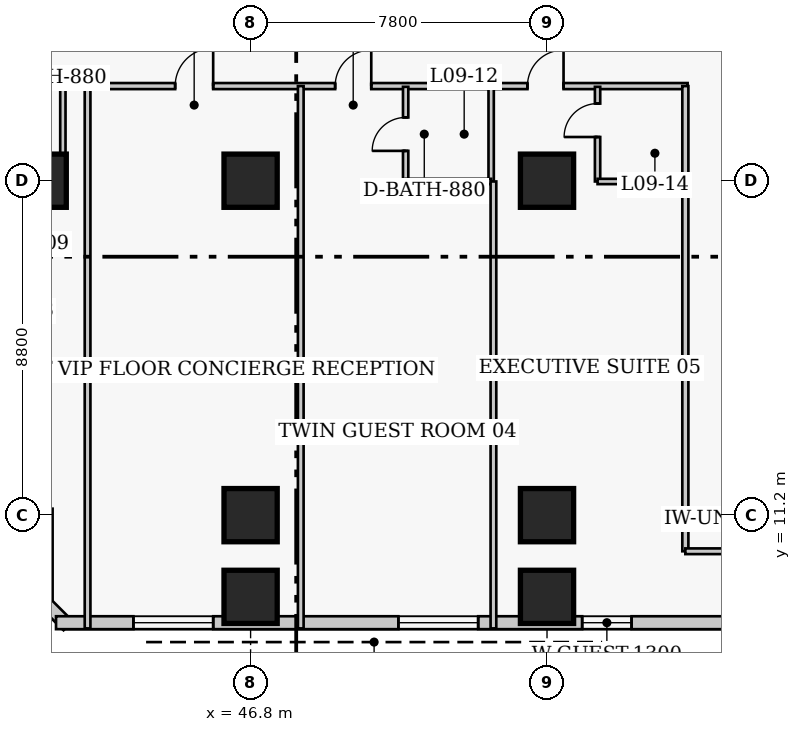
"""IFC4 building model, lengths in metres.
Left out: names, types, materials, properties, quantities, classifications, styles, units other than length and angle.
Written with IfcOpenShell. Run it as: python <this file> out.ifc"""

import sys

from ifc_helpers import new_model, si_unit, direction, frame, frame_2d, origin, origin_2d, place, context, subcontext, project, spatial, rectangle, extrude, element, fill, save


model = new_model("IFC4")
c1 = context("Model", 3, precision=1e-05, world=origin(), true_north=direction((0.0, 1.0)))
c2 = subcontext(c1, "Body", "Model", "MODEL_VIEW")
j1 = project(units=[si_unit("LENGTHUNIT", "METRE"), si_unit("PLANEANGLEUNIT", "RADIAN")], contexts=[c1])
p1 = place(None, origin())
s1 = spatial("IfcSite", under=j1, at=p1, CompositionType="ELEMENT")
p2 = place(p1, origin())
s2 = spatial("IfcBuilding", under=s1, at=p2, CompositionType="ELEMENT")
p3 = place(p2, frame((0.0, 0.0, 41.2)))
s3 = spatial("IfcBuildingStorey", under=s2, at=p3, CompositionType="ELEMENT", Elevation=41.2)
for number, where, z_axis, x_axis in (
    (1, (41.25, 20.0, 0.0), (0.0, 0.0, 1.0), (1.0, 0.0, 0.0)),
    (2, (46.8, 11.2, 0.0), (0.0, 0.0, 1.0), (1.0, 0.0, 0.0)),
    (3, (46.8, 20.0, 0.0), (0.0, 0.0, 1.0), (1.0, 0.0, 0.0)),
    (4, (54.6, 11.2, 0.0), (0.0, 0.0, 1.0), (1.0, 0.0, 0.0)),
    (5, (54.6, 20.0, 0.0), (0.0, 0.0, 1.0), (1.0, 0.0, 0.0)),
    (6, (46.8, 9.05, 0.0), (0.0, 0.0, 1.0), (1.0, 0.0, 0.0)),
    (7, (54.6, 9.05, 0.0), (0.0, 0.0, 1.0), (1.0, 0.0, 0.0)),
):
    element("IfcColumn", number, at=place(p3, frame(where, z_axis=z_axis, x_axis=x_axis)), inside=s3, PredefinedType="COLUMN", context=c2, shape_type="SweptSolid", body=[
        extrude(rectangle(XDim=1.4, YDim=1.4, at=origin_2d()), origin(), (0.0, 0.0, 1.0), 3.8),
    ])
p4 = place(p3, frame((41.342, 8.948, 0.0), z_axis=(0.0, 0.0, 1.0), x_axis=(0.707238225886, -0.706975312048, 0.0)))
e8 = element("IfcWall", 8, at=p4, inside=s3, PredefinedType="SOLIDWALL", context=c2, shape_type="SweptSolid", body=[
    extrude(rectangle(XDim=0.929, YDim=0.34, at=frame_2d((0.464, 0.0))), origin(), (0.0, 0.0, 1.0), 3.54),
])
p5 = place(p3, frame((41.68, 8.37, 0.0), z_axis=(0.0, 0.0, 1.0), x_axis=(1.0, 0.0, 0.0)))
e9 = element("IfcWall", 9, at=p5, inside=s3, PredefinedType="SOLIDWALL", context=c2, shape_type="SweptSolid", body=[
    extrude(rectangle(XDim=29.89, YDim=0.34, at=frame_2d((14.945, 0.0))), origin(), (0.0, 0.0, 1.0), 3.54),
])
p6 = place(p5, frame((2.036, 0.0, 0.85)))
e10 = element("IfcOpeningElement", 10, at=p6, cuts=e9, PredefinedType="OPENING", context=c2, shape_type="SweptSolid", body=[
    extrude(rectangle(XDim=2.1, YDim=1.85, at=frame_2d((1.05, 0.925))), frame((0.0, 0.18, 0.0), z_axis=(0.0, -1.0, 0.0), x_axis=(1.0, 0.0, 0.0)), (0.0, 0.0, 1.0), 0.36),
])
p7 = place(p5, frame((9.009, 0.0, 0.85)))
e11 = element("IfcOpeningElement", 11, at=p7, cuts=e9, PredefinedType="OPENING", context=c2, shape_type="SweptSolid", body=[
    extrude(rectangle(XDim=2.1, YDim=1.85, at=frame_2d((1.05, 0.925))), frame((0.0, 0.18, 0.0), z_axis=(0.0, -1.0, 0.0), x_axis=(1.0, 0.0, 0.0)), (0.0, 0.0, 1.0), 0.36),
])
p8 = place(p5, frame((26.254, 0.0, 0.85)))
e12 = element("IfcOpeningElement", 12, at=p8, cuts=e9, PredefinedType="OPENING", context=c2, shape_type="SweptSolid", body=[
    extrude(rectangle(XDim=2.1, YDim=1.85, at=frame_2d((1.05, 0.925))), frame((0.0, 0.18, 0.0), z_axis=(0.0, -1.0, 0.0), x_axis=(1.0, 0.0, 0.0)), (0.0, 0.0, 1.0), 0.36),
])
p9 = place(p5, frame((13.845, 0.0, 0.85)))
e13 = element("IfcOpeningElement", 13, at=p9, cuts=e9, PredefinedType="OPENING", context=c2, shape_type="SweptSolid", body=[
    extrude(rectangle(XDim=1.3, YDim=1.7, at=frame_2d((0.65, 0.85))), frame((0.0, 0.18, 0.0), z_axis=(0.0, -1.0, 0.0), x_axis=(1.0, 0.0, 0.0)), (0.0, 0.0, 1.0), 0.36),
])
p10 = place(p3, frame((35.8, 22.49, 0.0), z_axis=(0.0, 0.0, 1.0), x_axis=(1.0, 0.0, 0.0)))
e14 = element("IfcWall", 14, at=p10, inside=s3, PredefinedType="PARTITIONING", context=c2, shape_type="SweptSolid", body=[
    extrude(rectangle(XDim=22.5, YDim=0.16, at=frame_2d((11.25, 0.0))), origin(), (0.0, 0.0, 1.0), 3.54),
])
p11 = place(p10, frame((1.43, 0.0, 0.0)))
e15 = element("IfcOpeningElement", 15, at=p11, cuts=e14, PredefinedType="OPENING", context=c2, shape_type="SweptSolid", body=[
    extrude(rectangle(XDim=0.95, YDim=2.1, at=frame_2d((0.475, 1.05))), frame((0.0, 0.09, 0.0), z_axis=(0.0, -1.0, 0.0), x_axis=(1.0, 0.0, 0.0)), (0.0, 0.0, 1.0), 0.18),
])
p12 = place(p10, frame((9.015, 0.0, 0.0)))
e16 = element("IfcOpeningElement", 16, at=p12, cuts=e14, PredefinedType="OPENING", context=c2, shape_type="SweptSolid", body=[
    extrude(rectangle(XDim=1.0, YDim=2.15, at=frame_2d((0.5, 1.075))), frame((0.0, 0.09, 0.0), z_axis=(0.0, -1.0, 0.0), x_axis=(1.0, 0.0, 0.0)), (0.0, 0.0, 1.0), 0.18),
])
p13 = place(p10, frame((13.225, 0.0, 0.0)))
e17 = element("IfcOpeningElement", 17, at=p13, cuts=e14, PredefinedType="OPENING", context=c2, shape_type="SweptSolid", body=[
    extrude(rectangle(XDim=0.95, YDim=2.1, at=frame_2d((0.475, 1.05))), frame((0.0, 0.09, 0.0), z_axis=(0.0, -1.0, 0.0), x_axis=(1.0, 0.0, 0.0)), (0.0, 0.0, 1.0), 0.18),
])
p14 = place(p10, frame((18.285, 0.0, 0.0)))
e18 = element("IfcOpeningElement", 18, at=p14, cuts=e14, PredefinedType="OPENING", context=c2, shape_type="SweptSolid", body=[
    extrude(rectangle(XDim=0.95, YDim=2.1, at=frame_2d((0.475, 1.05))), frame((0.0, 0.09, 0.0), z_axis=(0.0, -1.0, 0.0), x_axis=(1.0, 0.0, 0.0)), (0.0, 0.0, 1.0), 0.18),
])
p15 = place(p3, frame((58.24, 10.25, 0.0), z_axis=(0.0, 0.0, 1.0), x_axis=(0.0, 1.0, 0.0)))
e19 = element("IfcWall", 19, at=p15, inside=s3, PredefinedType="PARTITIONING", context=c2, shape_type="SweptSolid", body=[
    extrude(rectangle(XDim=12.24, YDim=0.16, at=frame_2d((6.12, 0.0))), origin(), (0.0, 0.0, 1.0), 3.54),
])
p16 = place(p3, frame((58.24, 10.25, 0.0), z_axis=(0.0, 0.0, 1.0), x_axis=(1.0, 0.0, 0.0)))
e20 = element("IfcWall", 20, at=p16, inside=s3, PredefinedType="PARTITIONING", context=c2, shape_type="SweptSolid", body=[
    extrude(rectangle(XDim=2.22, YDim=0.15, at=frame_2d((1.11, 0.0))), origin(), (0.0, 0.0, 1.0), 3.54),
])
p17 = place(p3, frame((41.86, 19.98, 0.0), z_axis=(0.0, 0.0, 1.0), x_axis=(0.0, 1.0, 0.0)))
e21 = element("IfcWall", 21, at=p17, inside=s3, PredefinedType="PLUMBINGWALL", context=c2, shape_type="SweptSolid", body=[
    extrude(rectangle(XDim=2.49, YDim=0.14, at=frame_2d((1.245, 0.0))), origin(), (0.0, 0.0, 1.0), 3.54),
])
p18 = place(p3, frame((39.61, 19.98, 0.0), z_axis=(0.0, 0.0, 1.0), x_axis=(1.0, 0.0, 0.0)))
e22 = element("IfcWall", 22, at=p18, inside=s3, PredefinedType="PLUMBINGWALL", context=c2, shape_type="SweptSolid", body=[
    extrude(rectangle(XDim=2.25, YDim=0.14, at=frame_2d((1.125, 0.0))), origin(), (0.0, 0.0, 1.0), 2.593),
])
for number, where, z_axis, x_axis in (
    (23, (42.51, 8.22, 0.0), (0.0, 0.0, 1.0), (0.0, 1.0, 0.0)),
    (24, (48.12, 8.22, 0.0), (0.0, 0.0, 1.0), (0.0, 1.0, 0.0)),
):
    element("IfcWall", number, at=place(p3, frame(where, z_axis=z_axis, x_axis=x_axis)), inside=s3, PredefinedType="PARTITIONING", context=c2, shape_type="SweptSolid", body=[
        extrude(rectangle(XDim=14.27, YDim=0.15, at=frame_2d((7.135, 0.0))), origin(), (0.0, 0.0, 1.0), 3.54),
    ])
p19 = place(p3, frame((50.88, 19.98, 0.0), z_axis=(0.0, 0.0, 1.0), x_axis=(0.0, 1.0, 0.0)))
e25 = element("IfcWall", 25, at=p19, inside=s3, PredefinedType="PLUMBINGWALL", context=c2, shape_type="SweptSolid", body=[
    extrude(rectangle(XDim=2.49, YDim=0.14, at=frame_2d((1.245, 0.0))), origin(), (0.0, 0.0, 1.0), 3.54),
])
p20 = place(p19, frame((0.805, 0.0, 0.0)))
e26 = element("IfcOpeningElement", 26, at=p20, cuts=e25, PredefinedType="OPENING", context=c2, shape_type="SweptSolid", body=[
    extrude(rectangle(XDim=0.88, YDim=2.05, at=frame_2d((0.44, 1.025))), frame((0.0, 0.08, 0.0), z_axis=(0.0, -1.0, 0.0), x_axis=(1.0, 0.0, 0.0)), (0.0, 0.0, 1.0), 0.16),
])
p21 = place(p3, frame((53.13, 19.98, 0.0), z_axis=(0.0, 0.0, 1.0), x_axis=(0.0, 1.0, 0.0)))
e27 = element("IfcWall", 27, at=p21, inside=s3, PredefinedType="PLUMBINGWALL", context=c2, shape_type="SweptSolid", body=[
    extrude(rectangle(XDim=2.49, YDim=0.14, at=frame_2d((1.245, 0.0))), origin(), (0.0, 0.0, 1.0), 3.54),
])
p22 = place(p3, frame((50.88, 19.98, 0.0), z_axis=(0.0, 0.0, 1.0), x_axis=(1.0, 0.0, 0.0)))
e28 = element("IfcWall", 28, at=p22, inside=s3, PredefinedType="PLUMBINGWALL", context=c2, shape_type="SweptSolid", body=[
    extrude(rectangle(XDim=2.25, YDim=0.14, at=frame_2d((1.125, 0.0))), origin(), (0.0, 0.0, 1.0), 2.593),
])
p23 = place(p3, frame((53.19, 8.22, 0.0), z_axis=(0.0, 0.0, 1.0), x_axis=(0.0, 1.0, 0.0)))
e29 = element("IfcWall", 29, at=p23, inside=s3, PredefinedType="PARTITIONING", context=c2, shape_type="SweptSolid", body=[
    extrude(rectangle(XDim=11.76, YDim=0.15, at=frame_2d((5.88, 0.0))), origin(), (0.0, 0.0, 1.0), 3.54),
])
p24 = place(p3, frame((55.93, 19.98, 0.0), z_axis=(0.0, 0.0, 1.0), x_axis=(0.0, 1.0, 0.0)))
e30 = element("IfcWall", 30, at=p24, inside=s3, PredefinedType="PLUMBINGWALL", context=c2, shape_type="SweptSolid", body=[
    extrude(rectangle(XDim=2.49, YDim=0.14, at=frame_2d((1.245, 0.0))), origin(), (0.0, 0.0, 1.0), 3.54),
])
p25 = place(p24, frame((1.17, 0.0, 0.0)))
e31 = element("IfcOpeningElement", 31, at=p25, cuts=e30, PredefinedType="OPENING", context=c2, shape_type="SweptSolid", body=[
    extrude(rectangle(XDim=0.88, YDim=2.05, at=frame_2d((0.44, 1.025))), frame((0.0, 0.08, 0.0), z_axis=(0.0, -1.0, 0.0), x_axis=(1.0, 0.0, 0.0)), (0.0, 0.0, 1.0), 0.16),
])
p26 = place(p3, frame((55.93, 19.98, 0.0), z_axis=(0.0, 0.0, 1.0), x_axis=(1.0, 0.0, 0.0)))
e32 = element("IfcWall", 32, at=p26, inside=s3, PredefinedType="PLUMBINGWALL", context=c2, shape_type="SweptSolid", body=[
    extrude(rectangle(XDim=2.25, YDim=0.14, at=frame_2d((1.125, 0.0))), origin(), (0.0, 0.0, 1.0), 2.593),
])
p27 = place(p6, origin())
e33 = element("IfcWindow", 33, at=p27, inside=s3, PartitioningType="SINGLE_PANEL", PredefinedType="WINDOW", context=c2, shape_type="SweptSolid", body=[
    extrude(rectangle(XDim=2.1, YDim=1.85, at=frame_2d((1.05, 0.925))), frame((0.0, 0.03, 0.0), z_axis=(0.0, -1.0, 0.0), x_axis=(1.0, 0.0, 0.0)), (0.0, 0.0, 1.0), 0.06),
])
fill(e10, e33)
p28 = place(p7, origin())
e34 = element("IfcWindow", 34, at=p28, inside=s3, PartitioningType="SINGLE_PANEL", PredefinedType="WINDOW", context=c2, shape_type="SweptSolid", body=[
    extrude(rectangle(XDim=2.1, YDim=1.85, at=frame_2d((1.05, 0.925))), frame((0.0, 0.03, 0.0), z_axis=(0.0, -1.0, 0.0), x_axis=(1.0, 0.0, 0.0)), (0.0, 0.0, 1.0), 0.06),
])
fill(e11, e34)
p29 = place(p9, origin())
e35 = element("IfcWindow", 35, at=p29, inside=s3, PartitioningType="SINGLE_PANEL", PredefinedType="WINDOW", context=c2, shape_type="SweptSolid", body=[
    extrude(rectangle(XDim=1.3, YDim=1.7, at=frame_2d((0.65, 0.85))), frame((0.0, 0.03, 0.0), z_axis=(0.0, -1.0, 0.0), x_axis=(1.0, 0.0, 0.0)), (0.0, 0.0, 1.0), 0.06),
])
fill(e13, e35)
p30 = place(p12, origin())
e36 = element("IfcDoor", 36, at=p30, inside=s3, OperationType="SINGLE_SWING_RIGHT", PredefinedType="DOOR", context=c2, shape_type="SweptSolid", body=[
    extrude(rectangle(XDim=1.0, YDim=2.15, at=frame_2d((0.5, 1.075))), frame((0.0, 0.025, 0.0), z_axis=(0.0, -1.0, 0.0), x_axis=(1.0, 0.0, 0.0)), (0.0, 0.0, 1.0), 0.05),
])
fill(e16, e36)
p31 = place(p20, origin())
e37 = element("IfcDoor", 37, at=p31, inside=s3, OperationType="SINGLE_SWING_LEFT", PredefinedType="DOOR", context=c2, shape_type="SweptSolid", body=[
    extrude(rectangle(XDim=0.88, YDim=2.05, at=frame_2d((0.44, 1.025))), frame((0.0, 0.025, 0.0), z_axis=(0.0, -1.0, 0.0), x_axis=(1.0, 0.0, 0.0)), (0.0, 0.0, 1.0), 0.05),
])
fill(e26, e37)
p32 = place(p13, origin())
e38 = element("IfcDoor", 38, at=p32, inside=s3, OperationType="SINGLE_SWING_RIGHT", PredefinedType="DOOR", context=c2, shape_type="SweptSolid", body=[
    extrude(rectangle(XDim=0.95, YDim=2.1, at=frame_2d((0.475, 1.05))), frame((0.0, 0.025, 0.0), z_axis=(0.0, -1.0, 0.0), x_axis=(1.0, 0.0, 0.0)), (0.0, 0.0, 1.0), 0.05),
])
fill(e17, e38)
p33 = place(p25, origin())
e39 = element("IfcDoor", 39, at=p33, inside=s3, OperationType="SINGLE_SWING_LEFT", PredefinedType="DOOR", context=c2, shape_type="SweptSolid", body=[
    extrude(rectangle(XDim=0.88, YDim=2.05, at=frame_2d((0.44, 1.025))), frame((0.0, 0.025, 0.0), z_axis=(0.0, -1.0, 0.0), x_axis=(1.0, 0.0, 0.0)), (0.0, 0.0, 1.0), 0.05),
])
fill(e31, e39)
p34 = place(p14, origin())
e40 = element("IfcDoor", 40, at=p34, inside=s3, OperationType="SINGLE_SWING_RIGHT", PredefinedType="DOOR", context=c2, shape_type="SweptSolid", body=[
    extrude(rectangle(XDim=0.95, YDim=2.1, at=frame_2d((0.475, 1.05))), frame((0.0, 0.025, 0.0), z_axis=(0.0, -1.0, 0.0), x_axis=(1.0, 0.0, 0.0)), (0.0, 0.0, 1.0), 0.05),
])
fill(e18, e40)
save(model, sys.argv[1])
